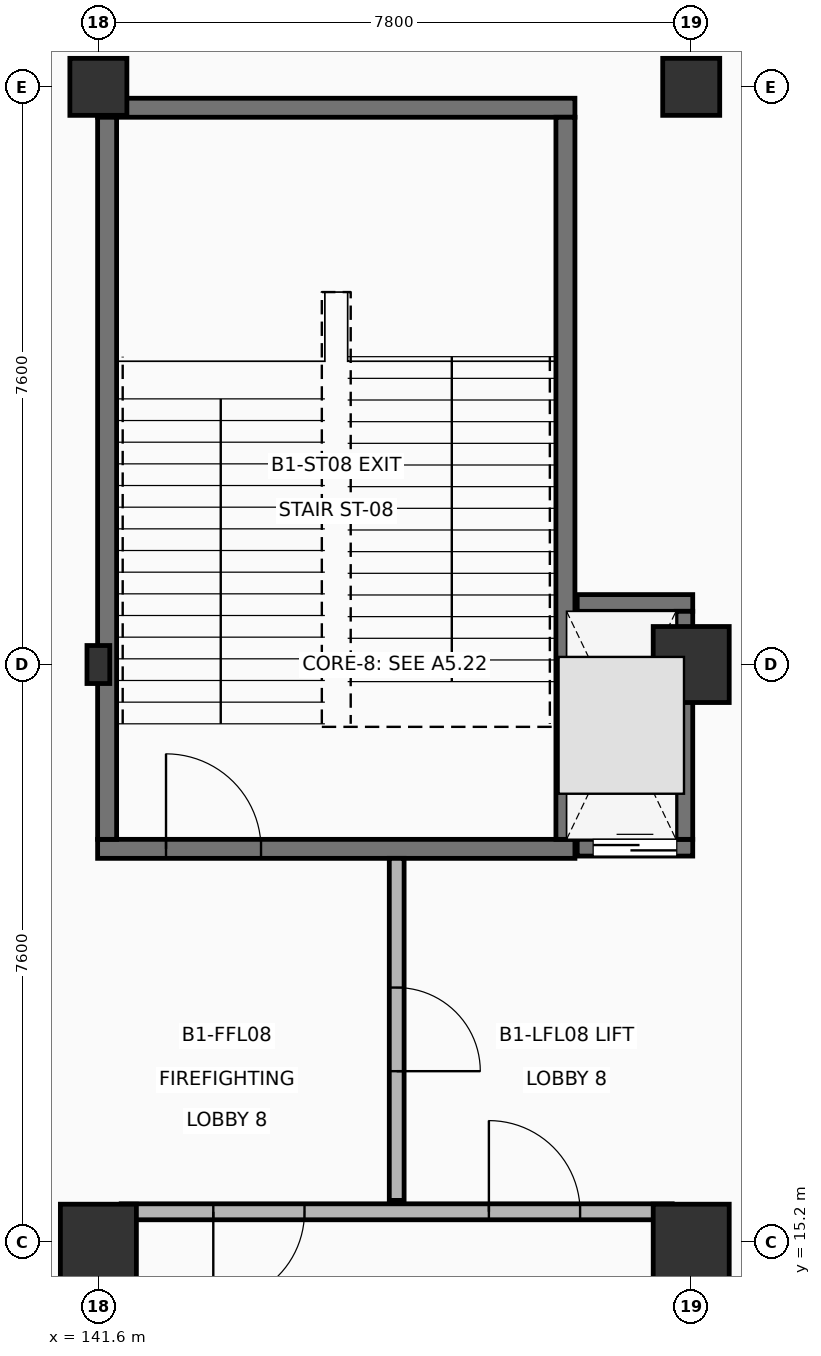
"""IFC4 building model, lengths in metres.
Left out: names, types, materials, properties, quantities, classifications, styles, units other than length and angle.
Written with IfcOpenShell. Run it as: python <this file> out.ifc"""

import sys

from ifc_helpers import new_model, si_unit, direction, frame, frame_2d, origin, origin_2d, place, context, subcontext, project, spatial, rectangle, hollow_rectangle, circle, extrude, element, fill, save


model = new_model("IFC4")
c1 = context("Model", 3, precision=1e-05, world=origin(), true_north=direction((0.0, 1.0)))
c2 = subcontext(c1, "Body", "Model", "MODEL_VIEW")
j1 = project(units=[si_unit("LENGTHUNIT", "METRE"), si_unit("PLANEANGLEUNIT", "RADIAN")], contexts=[c1])
p1 = place(None, origin())
s1 = spatial("IfcSite", under=j1, at=p1, CompositionType="ELEMENT")
p2 = place(p1, origin())
s2 = spatial("IfcBuilding", under=s1, at=p2, CompositionType="ELEMENT")
p3 = place(p2, frame((0.0, 0.0, -5.4)))
s3 = spatial("IfcBuildingStorey", under=s2, at=p3, CompositionType="ELEMENT", Elevation=-5.4)
p4 = place(p3, frame((141.6, 15.2, 0.0), z_axis=(0.0, 0.0, 1.0), x_axis=(1.0, 0.0, 0.0)))
e1 = element("IfcColumn", 1, at=p4, inside=s3, PredefinedType="COLUMN", context=c2, shape_type="SweptSolid", body=[
    extrude(rectangle(XDim=1.0, YDim=1.0, at=origin_2d()), origin(), (0.0, 0.0, 1.0), 5.4),
])
p5 = place(p3, frame((141.6, 22.8, 0.0), z_axis=(0.0, 0.0, 1.0), x_axis=(1.0, 0.0, 0.0)))
e2 = element("IfcColumn", 2, at=p5, inside=s3, PredefinedType="COLUMN", context=c2, shape_type="SweptSolid", body=[
    extrude(hollow_rectangle(XDim=0.3, YDim=0.5, WallThickness=0.016, at=origin_2d()), origin(), (0.0, 0.0, 1.0), 5.4),
])
p6 = place(p3, frame((141.6, 30.4, 0.0), z_axis=(0.0, 0.0, 1.0), x_axis=(1.0, 0.0, 0.0)))
e3 = element("IfcColumn", 3, at=p6, inside=s3, PredefinedType="COLUMN", context=c2, shape_type="SweptSolid", body=[
    extrude(circle(Radius=0.375, at=origin_2d()), origin(), (0.0, 0.0, 1.0), 5.4),
])
for number, where, z_axis, x_axis in (
    (4, (149.4, 15.2, 0.0), (0.0, 0.0, 1.0), (1.0, 0.0, 0.0)),
    (5, (149.4, 22.8, 0.0), (0.0, 0.0, 1.0), (1.0, 0.0, 0.0)),
):
    element("IfcColumn", number, at=place(p3, frame(where, z_axis=z_axis, x_axis=x_axis)), inside=s3, PredefinedType="COLUMN", context=c2, shape_type="SweptSolid", body=[
        extrude(rectangle(XDim=1.0, YDim=1.0, at=origin_2d()), origin(), (0.0, 0.0, 1.0), 5.4),
    ])
p7 = place(p3, frame((149.4, 30.4, 0.0), z_axis=(0.0, 0.0, 1.0), x_axis=(1.0, 0.0, 0.0)))
e6 = element("IfcColumn", 6, at=p7, inside=s3, PredefinedType="COLUMN", context=c2, shape_type="SweptSolid", body=[
    extrude(circle(Radius=0.375, at=origin_2d()), origin(), (0.0, 0.0, 1.0), 5.4),
])
p8 = place(p3, frame((141.59, 20.375, 0.0), z_axis=(0.0, 0.0, 1.0), x_axis=(1.0, 0.0, 0.0)))
e7 = element("IfcWall", 7, at=p8, inside=s3, PredefinedType="SHEAR", context=c2, shape_type="SweptSolid", body=[
    extrude(rectangle(XDim=6.28, YDim=0.25, at=frame_2d((3.14, 0.0))), origin(), (0.0, 0.0, 1.0), 5.12),
])
p9 = place(p8, frame((0.9, 0.0, 0.0)))
e8 = element("IfcOpeningElement", 8, at=p9, cuts=e7, PredefinedType="OPENING", context=c2, shape_type="SweptSolid", body=[
    extrude(rectangle(XDim=1.25, YDim=2.2, at=frame_2d((0.625, 1.1))), frame((0.0, 0.135, 0.0), z_axis=(0.0, -1.0, 0.0), x_axis=(1.0, 0.0, 0.0)), (0.0, 0.0, 1.0), 0.27),
])
p10 = place(p3, frame((141.59, 30.125, 0.0), z_axis=(0.0, 0.0, 1.0), x_axis=(1.0, 0.0, 0.0)))
e9 = element("IfcWall", 9, at=p10, inside=s3, PredefinedType="SHEAR", context=c2, shape_type="SweptSolid", body=[
    extrude(rectangle(XDim=6.28, YDim=0.25, at=frame_2d((3.14, 0.0))), origin(), (0.0, 0.0, 1.0), 5.12),
])
for number, where, z_axis, x_axis in (
    (10, (141.715, 20.5, 0.0), (0.0, 0.0, 1.0), (0.0, 1.0, 0.0)),
    (11, (147.745, 20.5, 0.0), (0.0, 0.0, 1.0), (0.0, 1.0, 0.0)),
):
    element("IfcWall", number, at=place(p3, frame(where, z_axis=z_axis, x_axis=x_axis)), inside=s3, PredefinedType="SHEAR", context=c2, shape_type="SweptSolid", body=[
        extrude(rectangle(XDim=9.5, YDim=0.25, at=frame_2d((4.75, 0.0))), origin(), (0.0, 0.0, 1.0), 5.12),
    ])
p11 = place(p3, frame((147.9, 20.39, 0.0), z_axis=(0.0, 0.0, 1.0), x_axis=(1.0, 0.0, 0.0)))
e12 = element("IfcWall", 12, at=p11, inside=s3, PredefinedType="SHEAR", context=c2, shape_type="SweptSolid", body=[
    extrude(rectangle(XDim=1.52, YDim=0.22, at=frame_2d((0.76, 0.0))), origin(), (0.0, 0.0, 1.0), 5.12),
])
p12 = place(p11, frame((0.21, 0.0, 0.0)))
e13 = element("IfcOpeningElement", 13, at=p12, cuts=e12, PredefinedType="OPENING", context=c2, shape_type="SweptSolid", body=[
    extrude(rectangle(XDim=1.1, YDim=2.15, at=frame_2d((0.55, 1.075))), frame((0.0, 0.12, 0.0), z_axis=(0.0, -1.0, 0.0), x_axis=(1.0, 0.0, 0.0)), (0.0, 0.0, 1.0), 0.24),
])
p13 = place(p3, frame((147.9, 23.61, 0.0), z_axis=(0.0, 0.0, 1.0), x_axis=(1.0, 0.0, 0.0)))
e14 = element("IfcWall", 14, at=p13, inside=s3, PredefinedType="SHEAR", context=c2, shape_type="SweptSolid", body=[
    extrude(rectangle(XDim=1.52, YDim=0.22, at=frame_2d((0.76, 0.0))), origin(), (0.0, 0.0, 1.0), 5.12),
])
p14 = place(p3, frame((149.31, 20.5, 0.0), z_axis=(0.0, 0.0, 1.0), x_axis=(0.0, 1.0, 0.0)))
e15 = element("IfcWall", 15, at=p14, inside=s3, PredefinedType="SHEAR", context=c2, shape_type="SweptSolid", body=[
    extrude(rectangle(XDim=3.0, YDim=0.22, at=frame_2d((1.5, 0.0))), origin(), (0.0, 0.0, 1.0), 5.12),
])
p15 = place(p3, frame((141.9, 15.6, 0.0), z_axis=(0.0, 0.0, 1.0), x_axis=(1.0, 0.0, 0.0)))
e16 = element("IfcWall", 16, at=p15, inside=s3, PredefinedType="PARTITIONING", context=c2, shape_type="SweptSolid", body=[
    extrude(rectangle(XDim=7.25, YDim=0.21, at=frame_2d((3.625, 0.0))), origin(), (0.0, 0.0, 1.0), 5.12),
])
p16 = place(p15, frame((1.212, 0.0, 0.0)))
e17 = element("IfcOpeningElement", 17, at=p16, cuts=e16, PredefinedType="OPENING", context=c2, shape_type="SweptSolid", body=[
    extrude(rectangle(XDim=1.2, YDim=2.2, at=frame_2d((0.6, 1.1))), frame((0.0, 0.115, 0.0), z_axis=(0.0, -1.0, 0.0), x_axis=(1.0, 0.0, 0.0)), (0.0, 0.0, 1.0), 0.23),
])
p17 = place(p15, frame((4.838, 0.0, 0.0)))
e18 = element("IfcOpeningElement", 18, at=p17, cuts=e16, PredefinedType="OPENING", context=c2, shape_type="SweptSolid", body=[
    extrude(rectangle(XDim=1.2, YDim=2.2, at=frame_2d((0.6, 1.1))), frame((0.0, 0.115, 0.0), z_axis=(0.0, -1.0, 0.0), x_axis=(1.0, 0.0, 0.0)), (0.0, 0.0, 1.0), 0.23),
])
p18 = place(p3, frame((145.525, 15.75, 0.0), z_axis=(0.0, 0.0, 1.0), x_axis=(0.0, 1.0, 0.0)))
e19 = element("IfcWall", 19, at=p18, inside=s3, PredefinedType="PARTITIONING", context=c2, shape_type="SweptSolid", body=[
    extrude(rectangle(XDim=4.5, YDim=0.195, at=frame_2d((2.25, 0.0))), origin(), (0.0, 0.0, 1.0), 5.12),
])
p19 = place(p18, frame((1.7, 0.0, 0.0)))
e20 = element("IfcOpeningElement", 20, at=p19, cuts=e19, PredefinedType="OPENING", context=c2, shape_type="SweptSolid", body=[
    extrude(rectangle(XDim=1.1, YDim=2.15, at=frame_2d((0.55, 1.075))), frame((0.0, 0.107, 0.0), z_axis=(0.0, -1.0, 0.0), x_axis=(1.0, 0.0, 0.0)), (0.0, 0.0, 1.0), 0.215),
])
p20 = place(p9, origin())
e21 = element("IfcDoor", 21, at=p20, inside=s3, OperationType="SINGLE_SWING_LEFT", PredefinedType="DOOR", context=c2, shape_type="SweptSolid", body=[
    extrude(rectangle(XDim=1.25, YDim=2.2, at=frame_2d((0.625, 1.1))), frame((0.0, 0.025, 0.0), z_axis=(0.0, -1.0, 0.0), x_axis=(1.0, 0.0, 0.0)), (0.0, 0.0, 1.0), 0.05),
])
fill(e8, e21)
p21 = place(p12, origin())
e22 = element("IfcDoor", 22, at=p21, inside=s3, OperationType="DOUBLE_DOOR_SLIDING", PredefinedType="DOOR", context=c2, shape_type="SweptSolid", body=[
    extrude(rectangle(XDim=1.1, YDim=2.15, at=frame_2d((0.55, 1.075))), frame((0.0, 0.025, 0.0), z_axis=(0.0, -1.0, 0.0), x_axis=(1.0, 0.0, 0.0)), (0.0, 0.0, 1.0), 0.05),
])
fill(e13, e22)
p22 = place(p16, origin())
e23 = element("IfcDoor", 23, at=p22, inside=s3, OperationType="SINGLE_SWING_RIGHT", PredefinedType="DOOR", context=c2, shape_type="SweptSolid", body=[
    extrude(rectangle(XDim=1.2, YDim=2.2, at=frame_2d((0.6, 1.1))), frame((0.0, 0.025, 0.0), z_axis=(0.0, -1.0, 0.0), x_axis=(1.0, 0.0, 0.0)), (0.0, 0.0, 1.0), 0.05),
])
fill(e17, e23)
p23 = place(p17, origin())
e24 = element("IfcDoor", 24, at=p23, inside=s3, OperationType="SINGLE_SWING_LEFT", PredefinedType="DOOR", context=c2, shape_type="SweptSolid", body=[
    extrude(rectangle(XDim=1.2, YDim=2.2, at=frame_2d((0.6, 1.1))), frame((0.0, 0.025, 0.0), z_axis=(0.0, -1.0, 0.0), x_axis=(1.0, 0.0, 0.0)), (0.0, 0.0, 1.0), 0.05),
])
fill(e18, e24)
p24 = place(p19, origin())
e25 = element("IfcDoor", 25, at=p24, inside=s3, OperationType="SINGLE_SWING_RIGHT", PredefinedType="DOOR", context=c2, shape_type="SweptSolid", body=[
    extrude(rectangle(XDim=1.1, YDim=2.15, at=frame_2d((0.55, 1.075))), frame((0.0, 0.025, 0.0), z_axis=(0.0, -1.0, 0.0), x_axis=(1.0, 0.0, 0.0)), (0.0, 0.0, 1.0), 0.05),
])
fill(e20, e25)
save(model, sys.argv[1])
